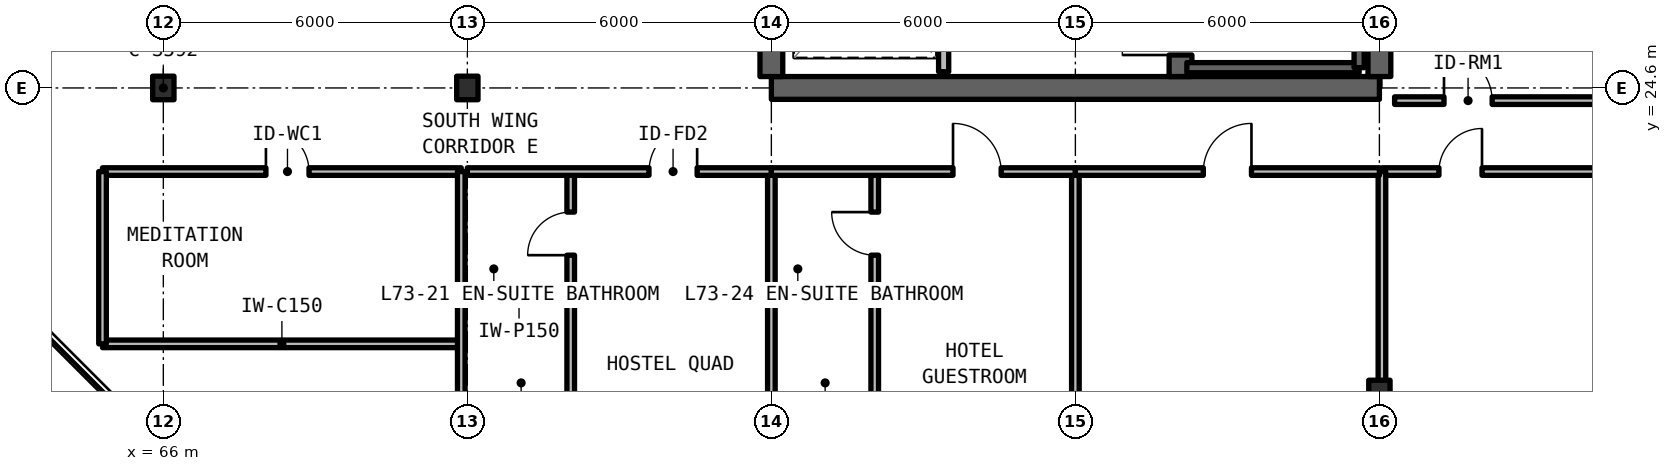
"""IFC4 building model, lengths in metres.
Left out: names, types, materials, properties, quantities, classifications, styles, units other than length and angle.
Written with IfcOpenShell. Run it as: python <this file> out.ifc"""

import sys

from ifc_helpers import new_model, si_unit, direction, frame, frame_2d, origin, origin_2d, place, context, subcontext, project, spatial, rectangle, i_section, extrude, element, fill, save


model = new_model("IFC4")
c1 = context("Model", 3, precision=1e-05, world=origin(), true_north=direction((0.0, 1.0)))
c2 = subcontext(c1, "Body", "Model", "MODEL_VIEW")
j1 = project(units=[si_unit("LENGTHUNIT", "METRE"), si_unit("PLANEANGLEUNIT", "RADIAN")], contexts=[c1])
p1 = place(None, origin())
s1 = spatial("IfcSite", under=j1, at=p1, CompositionType="ELEMENT")
p2 = place(p1, origin())
s2 = spatial("IfcBuilding", under=s1, at=p2, CompositionType="ELEMENT")
p3 = place(p2, frame((0.0, 0.0, 260.7)))
s3 = spatial("IfcBuildingStorey", under=s2, at=p3, CompositionType="ELEMENT", Elevation=260.7)
p4 = place(p3, frame((78.0, 24.6, 0.0), z_axis=(0.0, 0.0, 1.0), x_axis=(1.0, 0.0, 0.0)))
e1 = element("IfcWall", 1, at=p4, inside=s3, PredefinedType="SHEAR", context=c2, shape_type="SweptSolid", body=[
    extrude(rectangle(XDim=12.0, YDim=0.45, at=frame_2d((6.0, 0.0))), origin(), (0.0, 0.0, 1.0), 3.63),
])
p5 = place(p3, frame((90.0, 24.825, 0.0), z_axis=(0.0, 0.0, 1.0), x_axis=(0.0, 1.0, 0.0)))
e2 = element("IfcWall", 2, at=p5, inside=s3, PredefinedType="SHEAR", context=c2, shape_type="SweptSolid", body=[
    extrude(rectangle(XDim=17.55, YDim=0.45, at=frame_2d((8.775, 0.0))), origin(), (0.0, 0.0, 1.0), 3.63),
])
p6 = place(p3, frame((78.0, 24.825, 0.0), z_axis=(0.0, 0.0, 1.0), x_axis=(0.0, 1.0, 0.0)))
e3 = element("IfcWall", 3, at=p6, inside=s3, PredefinedType="SHEAR", context=c2, shape_type="SweptSolid", body=[
    extrude(rectangle(XDim=8.975, YDim=0.45, at=frame_2d((4.488, 0.0))), origin(), (0.0, 0.0, 1.0), 3.63),
])
p7 = place(p3, frame((86.075, 24.825, 0.0), z_axis=(0.0, 0.0, 1.0), x_axis=(0.0, 1.0, 0.0)))
e4 = element("IfcWall", 4, at=p7, inside=s3, PredefinedType="SHEAR", context=c2, shape_type="SweptSolid", body=[
    extrude(rectangle(XDim=17.55, YDim=0.45, at=frame_2d((8.775, 0.0))), origin(), (0.0, 0.0, 1.0), 3.63),
])
p8 = place(p7, frame((0.425, 0.0, 0.0)))
e5 = element("IfcOpeningElement", 5, at=p8, cuts=e4, PredefinedType="OPENING", context=c2, shape_type="SweptSolid", body=[
    extrude(rectangle(XDim=1.15, YDim=2.15, at=frame_2d((0.575, 1.075))), frame((0.0, 0.235, 0.0), z_axis=(0.0, -1.0, 0.0), x_axis=(1.0, 0.0, 0.0)), (0.0, 0.0, 1.0), 0.47),
])
p9 = place(p7, frame((9.625, 0.0, 0.0)))
e6 = element("IfcOpeningElement", 6, at=p9, cuts=e4, PredefinedType="OPENING", context=c2, shape_type="SweptSolid", body=[
    extrude(rectangle(XDim=1.15, YDim=2.15, at=frame_2d((0.575, 1.075))), frame((0.0, 0.235, 0.0), z_axis=(0.0, -1.0, 0.0), x_axis=(1.0, 0.0, 0.0)), (0.0, 0.0, 1.0), 0.47),
])
for number, where, z_axis, x_axis in (
    (7, (66.0, 24.6, 0.0), (0.0, 0.0, 1.0), (1.0, 0.0, 0.0)),
    (8, (72.0, 24.6, 0.0), (0.0, 0.0, 1.0), (1.0, 0.0, 0.0)),
    (9, (90.0, 18.6, 0.0), (0.0, 0.0, 1.0), (1.0, 0.0, 0.0)),
):
    element("IfcColumn", number, at=place(p3, frame(where, z_axis=z_axis, x_axis=x_axis)), inside=s3, PredefinedType="COLUMN", context=c2, shape_type="SweptSolid", body=[
        extrude(i_section(OverallWidth=0.421, OverallDepth=0.465, WebThickness=0.045, FlangeThickness=0.07, FilletRadius=0.015, at=origin_2d()), origin(), (0.0, 0.0, 1.0), 3.63),
    ])
p10 = place(p3, frame((81.4, 24.92, 0.0), z_axis=(0.0, 0.0, 1.0), x_axis=(0.0, 1.0, 0.0)))
e10 = element("IfcWall", 10, at=p10, inside=s3, PredefinedType="SOLIDWALL", context=c2, shape_type="SweptSolid", body=[
    extrude(rectangle(XDim=3.58, YDim=0.2, at=frame_2d((1.79, 0.0))), origin(), (0.0, 0.0, 1.0), 2.63),
])
p11 = place(p10, frame((1.3, 0.0, 0.0)))
e11 = element("IfcOpeningElement", 11, at=p11, cuts=e10, PredefinedType="OPENING", context=c2, shape_type="SweptSolid", body=[
    extrude(rectangle(XDim=1.1, YDim=2.2, at=frame_2d((0.55, 1.1))), frame((0.0, 0.11, 0.0), z_axis=(0.0, -1.0, 0.0), x_axis=(1.0, 0.0, 0.0)), (0.0, 0.0, 1.0), 0.22),
])
p12 = place(p3, frame((64.8, 19.55, 0.0), z_axis=(0.0, 0.0, 1.0), x_axis=(1.0, 0.0, 0.0)))
e12 = element("IfcWall", 12, at=p12, inside=s3, PredefinedType="SOLIDWALL", context=c2, shape_type="SweptSolid", body=[
    extrude(rectangle(XDim=7.08, YDim=0.15, at=frame_2d((3.54, 0.0))), origin(), (0.0, 0.0, 1.0), 2.63),
])
p13 = place(p3, frame((64.8, 22.95, 0.0), z_axis=(0.0, 0.0, 1.0), x_axis=(1.0, 0.0, 0.0)))
e13 = element("IfcWall", 13, at=p13, inside=s3, PredefinedType="SOLIDWALL", context=c2, shape_type="SweptSolid", body=[
    extrude(rectangle(XDim=7.08, YDim=0.15, at=frame_2d((3.54, 0.0))), origin(), (0.0, 0.0, 1.0), 2.63),
])
p14 = place(p13, frame((3.225, 0.0, 0.0)))
e14 = element("IfcOpeningElement", 14, at=p14, cuts=e13, PredefinedType="OPENING", context=c2, shape_type="SweptSolid", body=[
    extrude(rectangle(XDim=0.85, YDim=2.1, at=frame_2d((0.425, 1.05))), frame((0.0, 0.085, 0.0), z_axis=(0.0, -1.0, 0.0), x_axis=(1.0, 0.0, 0.0)), (0.0, 0.0, 1.0), 0.17),
])
p15 = place(p3, frame((64.8, 19.55, 0.0), z_axis=(0.0, 0.0, 1.0), x_axis=(0.0, 1.0, 0.0)))
e15 = element("IfcWall", 15, at=p15, inside=s3, PredefinedType="SOLIDWALL", context=c2, shape_type="SweptSolid", body=[
    extrude(rectangle(XDim=3.4, YDim=0.15, at=frame_2d((1.7, 0.0))), origin(), (0.0, 0.0, 1.0), 2.63),
])
p16 = place(p3, frame((71.88, 12.34, 0.0), z_axis=(0.0, 0.0, 1.0), x_axis=(0.0, 1.0, 0.0)))
e16 = element("IfcWall", 16, at=p16, inside=s3, PredefinedType="SOLIDWALL", context=c2, shape_type="SweptSolid", body=[
    extrude(rectangle(XDim=10.61, YDim=0.15, at=frame_2d((5.305, 0.0))), origin(), (0.0, 0.0, 1.0), 2.63),
])
p17 = place(p3, frame((90.3, 24.35, 0.0), z_axis=(0.0, 0.0, 1.0), x_axis=(1.0, 0.0, 0.0)))
e17 = element("IfcWall", 17, at=p17, inside=s3, PredefinedType="SOLIDWALL", context=c2, shape_type="SweptSolid", body=[
    extrude(rectangle(XDim=8.52, YDim=0.15, at=frame_2d((4.26, 0.0))), origin(), (0.0, 0.0, 1.0), 2.63),
])
p18 = place(p17, frame((0.975, 0.0, 0.0)))
e18 = element("IfcOpeningElement", 18, at=p18, cuts=e17, PredefinedType="OPENING", context=c2, shape_type="SweptSolid", body=[
    extrude(rectangle(XDim=0.95, YDim=2.15, at=frame_2d((0.475, 1.075))), frame((0.0, 0.085, 0.0), z_axis=(0.0, -1.0, 0.0), x_axis=(1.0, 0.0, 0.0)), (0.0, 0.0, 1.0), 0.17),
])
p19 = place(p3, frame((90.05, 22.95, 0.0), z_axis=(0.0, 0.0, 1.0), x_axis=(1.0, 0.0, 0.0)))
e19 = element("IfcWall", 19, at=p19, inside=s3, PredefinedType="SOLIDWALL", context=c2, shape_type="SweptSolid", body=[
    extrude(rectangle(XDim=5.37, YDim=0.15, at=frame_2d((2.685, 0.0))), origin(), (0.0, 0.0, 1.0), 2.63),
])
p20 = place(p19, frame((1.125, 0.0, 0.0)))
e20 = element("IfcOpeningElement", 20, at=p20, cuts=e19, PredefinedType="OPENING", context=c2, shape_type="SweptSolid", body=[
    extrude(rectangle(XDim=0.85, YDim=2.1, at=frame_2d((0.425, 1.05))), frame((0.0, 0.085, 0.0), z_axis=(0.0, -1.0, 0.0), x_axis=(1.0, 0.0, 0.0)), (0.0, 0.0, 1.0), 0.17),
])
for number, where, z_axis, x_axis in (
    (21, (90.05, 12.34, 0.0), (0.0, 0.0, 1.0), (0.0, 1.0, 0.0)),
    (22, (78.0, 12.34, 0.0), (0.0, 0.0, 1.0), (0.0, 1.0, 0.0)),
):
    element("IfcWall", number, at=place(p3, frame(where, z_axis=z_axis, x_axis=x_axis)), inside=s3, PredefinedType="SOLIDWALL", context=c2, shape_type="SweptSolid", body=[
        extrude(rectangle(XDim=10.61, YDim=0.15, at=frame_2d((5.305, 0.0))), origin(), (0.0, 0.0, 1.0), 2.63),
    ])
p21 = place(p3, frame((72.0, 20.5, 0.0), z_axis=(0.0, 0.0, 1.0), x_axis=(1.0, 0.0, 0.0)))
e23 = element("IfcWall", 23, at=p21, inside=s3, PredefinedType="PARTITIONING", context=c2, shape_type="SweptSolid", body=[
    extrude(rectangle(XDim=2.04, YDim=0.15, at=frame_2d((1.02, 0.0))), origin(), (0.0, 0.0, 1.0), 2.63),
])
p22 = place(p3, frame((74.04, 12.34, 0.0), z_axis=(0.0, 0.0, 1.0), x_axis=(0.0, 1.0, 0.0)))
e24 = element("IfcWall", 24, at=p22, inside=s3, PredefinedType="PARTITIONING", context=c2, shape_type="SweptSolid", body=[
    extrude(rectangle(XDim=10.61, YDim=0.15, at=frame_2d((5.305, 0.0))), origin(), (0.0, 0.0, 1.0), 2.63),
])
p23 = place(p22, frame((3.124, 0.0, 0.0)))
e25 = element("IfcOpeningElement", 25, at=p23, cuts=e24, PredefinedType="OPENING", context=c2, shape_type="SweptSolid", body=[
    extrude(rectangle(XDim=0.85, YDim=2.1, at=frame_2d((0.425, 1.05))), frame((0.0, 0.085, 0.0), z_axis=(0.0, -1.0, 0.0), x_axis=(1.0, 0.0, 0.0)), (0.0, 0.0, 1.0), 0.17),
])
p24 = place(p22, frame((8.96, 0.0, 0.0)))
e26 = element("IfcOpeningElement", 26, at=p24, cuts=e24, PredefinedType="OPENING", context=c2, shape_type="SweptSolid", body=[
    extrude(rectangle(XDim=0.85, YDim=2.1, at=frame_2d((0.425, 1.05))), frame((0.0, 0.085, 0.0), z_axis=(0.0, -1.0, 0.0), x_axis=(1.0, 0.0, 0.0)), (0.0, 0.0, 1.0), 0.17),
])
p25 = place(p3, frame((72.0, 22.95, 0.0), z_axis=(0.0, 0.0, 1.0), x_axis=(1.0, 0.0, 0.0)))
e27 = element("IfcWall", 27, at=p25, inside=s3, PredefinedType="SOLIDWALL", context=c2, shape_type="SweptSolid", body=[
    extrude(rectangle(XDim=6.0, YDim=0.15, at=frame_2d((3.0, 0.0))), origin(), (0.0, 0.0, 1.0), 2.63),
])
p26 = place(p25, frame((3.585, 0.0, 0.0)))
e28 = element("IfcOpeningElement", 28, at=p26, cuts=e27, PredefinedType="OPENING", context=c2, shape_type="SweptSolid", body=[
    extrude(rectangle(XDim=0.95, YDim=2.15, at=frame_2d((0.475, 1.075))), frame((0.0, 0.085, 0.0), z_axis=(0.0, -1.0, 0.0), x_axis=(1.0, 0.0, 0.0)), (0.0, 0.0, 1.0), 0.17),
])
p27 = place(p3, frame((84.0, 12.34, 0.0), z_axis=(0.0, 0.0, 1.0), x_axis=(0.0, 1.0, 0.0)))
e29 = element("IfcWall", 29, at=p27, inside=s3, PredefinedType="SOLIDWALL", context=c2, shape_type="SweptSolid", body=[
    extrude(rectangle(XDim=10.61, YDim=0.15, at=frame_2d((5.305, 0.0))), origin(), (0.0, 0.0, 1.0), 2.63),
])
p28 = place(p3, frame((78.0, 20.5, 0.0), z_axis=(0.0, 0.0, 1.0), x_axis=(1.0, 0.0, 0.0)))
e30 = element("IfcWall", 30, at=p28, inside=s3, PredefinedType="PARTITIONING", context=c2, shape_type="SweptSolid", body=[
    extrude(rectangle(XDim=2.04, YDim=0.15, at=frame_2d((1.02, 0.0))), origin(), (0.0, 0.0, 1.0), 2.63),
])
p29 = place(p3, frame((80.04, 12.34, 0.0), z_axis=(0.0, 0.0, 1.0), x_axis=(0.0, 1.0, 0.0)))
e31 = element("IfcWall", 31, at=p29, inside=s3, PredefinedType="PARTITIONING", context=c2, shape_type="SweptSolid", body=[
    extrude(rectangle(XDim=10.61, YDim=0.15, at=frame_2d((5.305, 0.0))), origin(), (0.0, 0.0, 1.0), 2.63),
])
p30 = place(p29, frame((3.124, 0.0, 0.0)))
e32 = element("IfcOpeningElement", 32, at=p30, cuts=e31, PredefinedType="OPENING", context=c2, shape_type="SweptSolid", body=[
    extrude(rectangle(XDim=0.85, YDim=2.1, at=frame_2d((0.425, 1.05))), frame((0.0, 0.085, 0.0), z_axis=(0.0, -1.0, 0.0), x_axis=(1.0, 0.0, 0.0)), (0.0, 0.0, 1.0), 0.17),
])
p31 = place(p29, frame((8.96, 0.0, 0.0)))
e33 = element("IfcOpeningElement", 33, at=p31, cuts=e31, PredefinedType="OPENING", context=c2, shape_type="SweptSolid", body=[
    extrude(rectangle(XDim=0.85, YDim=2.1, at=frame_2d((0.425, 1.05))), frame((0.0, 0.085, 0.0), z_axis=(0.0, -1.0, 0.0), x_axis=(1.0, 0.0, 0.0)), (0.0, 0.0, 1.0), 0.17),
])
p32 = place(p3, frame((78.0, 22.95, 0.0), z_axis=(0.0, 0.0, 1.0), x_axis=(1.0, 0.0, 0.0)))
e34 = element("IfcWall", 34, at=p32, inside=s3, PredefinedType="SOLIDWALL", context=c2, shape_type="SweptSolid", body=[
    extrude(rectangle(XDim=6.0, YDim=0.15, at=frame_2d((3.0, 0.0))), origin(), (0.0, 0.0, 1.0), 2.63),
])
p33 = place(p32, frame((3.585, 0.0, 0.0)))
e35 = element("IfcOpeningElement", 35, at=p33, cuts=e34, PredefinedType="OPENING", context=c2, shape_type="SweptSolid", body=[
    extrude(rectangle(XDim=0.95, YDim=2.15, at=frame_2d((0.475, 1.075))), frame((0.0, 0.085, 0.0), z_axis=(0.0, -1.0, 0.0), x_axis=(1.0, 0.0, 0.0)), (0.0, 0.0, 1.0), 0.17),
])
p34 = place(p3, frame((84.0, 22.95, 0.0), z_axis=(0.0, 0.0, 1.0), x_axis=(1.0, 0.0, 0.0)))
e36 = element("IfcWall", 36, at=p34, inside=s3, PredefinedType="SOLIDWALL", context=c2, shape_type="SweptSolid", body=[
    extrude(rectangle(XDim=6.0, YDim=0.15, at=frame_2d((3.0, 0.0))), origin(), (0.0, 0.0, 1.0), 2.63),
])
p35 = place(p34, frame((2.525, 0.0, 0.0)))
e37 = element("IfcOpeningElement", 37, at=p35, cuts=e36, PredefinedType="OPENING", context=c2, shape_type="SweptSolid", body=[
    extrude(rectangle(XDim=0.95, YDim=2.15, at=frame_2d((0.475, 1.075))), frame((0.0, 0.085, 0.0), z_axis=(0.0, -1.0, 0.0), x_axis=(1.0, 0.0, 0.0)), (0.0, 0.0, 1.0), 0.17),
])
p36 = place(p3, frame((86.2, 25.0, 0.0), z_axis=(0.0, 0.0, 1.0), x_axis=(1.0, 0.0, 0.0)))
e38 = element("IfcWall", 38, at=p36, inside=s3, PredefinedType="SOLIDWALL", context=c2, shape_type="SweptSolid", body=[
    extrude(rectangle(XDim=3.4, YDim=0.2, at=frame_2d((1.7, 0.0))), origin(), (0.0, 0.0, 1.0), 3.63),
])
p37 = place(p3, frame((89.6, 25.0, 0.0), z_axis=(0.0, 0.0, 1.0), x_axis=(0.0, 1.0, 0.0)))
e39 = element("IfcWall", 39, at=p37, inside=s3, PredefinedType="SOLIDWALL", context=c2, shape_type="SweptSolid", body=[
    extrude(rectangle(XDim=8.0, YDim=0.2, at=frame_2d((4.0, 0.0))), origin(), (0.0, 0.0, 1.0), 3.63),
])
p38 = place(p14, origin())
e40 = element("IfcDoor", 40, at=p38, inside=s3, OperationType="SINGLE_SWING_LEFT", PredefinedType="DOOR", context=c2, shape_type="SweptSolid", body=[
    extrude(rectangle(XDim=0.85, YDim=2.1, at=frame_2d((0.425, 1.05))), frame((0.0, 0.025, 0.0), z_axis=(0.0, -1.0, 0.0), x_axis=(1.0, 0.0, 0.0)), (0.0, 0.0, 1.0), 0.05),
])
fill(e14, e40)
p39 = place(p18, origin())
e41 = element("IfcDoor", 41, at=p39, inside=s3, OperationType="SINGLE_SWING_LEFT", PredefinedType="DOOR", context=c2, shape_type="SweptSolid", body=[
    extrude(rectangle(XDim=0.95, YDim=2.15, at=frame_2d((0.475, 1.075))), frame((0.0, 0.025, 0.0), z_axis=(0.0, -1.0, 0.0), x_axis=(1.0, 0.0, 0.0)), (0.0, 0.0, 1.0), 0.05),
])
fill(e18, e41)
p40 = place(p20, origin())
e42 = element("IfcDoor", 42, at=p40, inside=s3, OperationType="SINGLE_SWING_RIGHT", PredefinedType="DOOR", context=c2, shape_type="SweptSolid", body=[
    extrude(rectangle(XDim=0.85, YDim=2.1, at=frame_2d((0.425, 1.05))), frame((0.0, 0.025, 0.0), z_axis=(0.0, -1.0, 0.0), x_axis=(1.0, 0.0, 0.0)), (0.0, 0.0, 1.0), 0.05),
])
fill(e20, e42)
p41 = place(p24, origin())
e43 = element("IfcDoor", 43, at=p41, inside=s3, OperationType="SINGLE_SWING_LEFT", PredefinedType="DOOR", context=c2, shape_type="SweptSolid", body=[
    extrude(rectangle(XDim=0.85, YDim=2.1, at=frame_2d((0.425, 1.05))), frame((0.0, 0.025, 0.0), z_axis=(0.0, -1.0, 0.0), x_axis=(1.0, 0.0, 0.0)), (0.0, 0.0, 1.0), 0.05),
])
fill(e26, e43)
p42 = place(p26, origin())
e44 = element("IfcDoor", 44, at=p42, inside=s3, OperationType="SINGLE_SWING_RIGHT", PredefinedType="DOOR", context=c2, shape_type="SweptSolid", body=[
    extrude(rectangle(XDim=0.95, YDim=2.15, at=frame_2d((0.475, 1.075))), frame((0.0, 0.025, 0.0), z_axis=(0.0, -1.0, 0.0), x_axis=(1.0, 0.0, 0.0)), (0.0, 0.0, 1.0), 0.05),
])
fill(e28, e44)
p43 = place(p31, origin())
e45 = element("IfcDoor", 45, at=p43, inside=s3, OperationType="SINGLE_SWING_RIGHT", PredefinedType="DOOR", context=c2, shape_type="SweptSolid", body=[
    extrude(rectangle(XDim=0.85, YDim=2.1, at=frame_2d((0.425, 1.05))), frame((0.0, 0.025, 0.0), z_axis=(0.0, -1.0, 0.0), x_axis=(1.0, 0.0, 0.0)), (0.0, 0.0, 1.0), 0.05),
])
fill(e33, e45)
p44 = place(p33, origin())
e46 = element("IfcDoor", 46, at=p44, inside=s3, OperationType="SINGLE_SWING_LEFT", PredefinedType="DOOR", context=c2, shape_type="SweptSolid", body=[
    extrude(rectangle(XDim=0.95, YDim=2.15, at=frame_2d((0.475, 1.075))), frame((0.0, 0.025, 0.0), z_axis=(0.0, -1.0, 0.0), x_axis=(1.0, 0.0, 0.0)), (0.0, 0.0, 1.0), 0.05),
])
fill(e35, e46)
p45 = place(p35, origin())
e47 = element("IfcDoor", 47, at=p45, inside=s3, OperationType="SINGLE_SWING_RIGHT", PredefinedType="DOOR", context=c2, shape_type="SweptSolid", body=[
    extrude(rectangle(XDim=0.95, YDim=2.15, at=frame_2d((0.475, 1.075))), frame((0.0, 0.025, 0.0), z_axis=(0.0, -1.0, 0.0), x_axis=(1.0, 0.0, 0.0)), (0.0, 0.0, 1.0), 0.05),
])
fill(e37, e47)
p46 = place(p8, origin())
e48 = element("IfcDoor", 48, at=p46, inside=s3, OperationType="SINGLE_SWING_LEFT", PredefinedType="DOOR", context=c2, shape_type="SweptSolid", body=[
    extrude(rectangle(XDim=1.15, YDim=2.15, at=frame_2d((0.575, 1.075))), frame((0.0, 0.025, 0.0), z_axis=(0.0, -1.0, 0.0), x_axis=(1.0, 0.0, 0.0)), (0.0, 0.0, 1.0), 0.05),
])
fill(e5, e48)
save(model, sys.argv[1])
